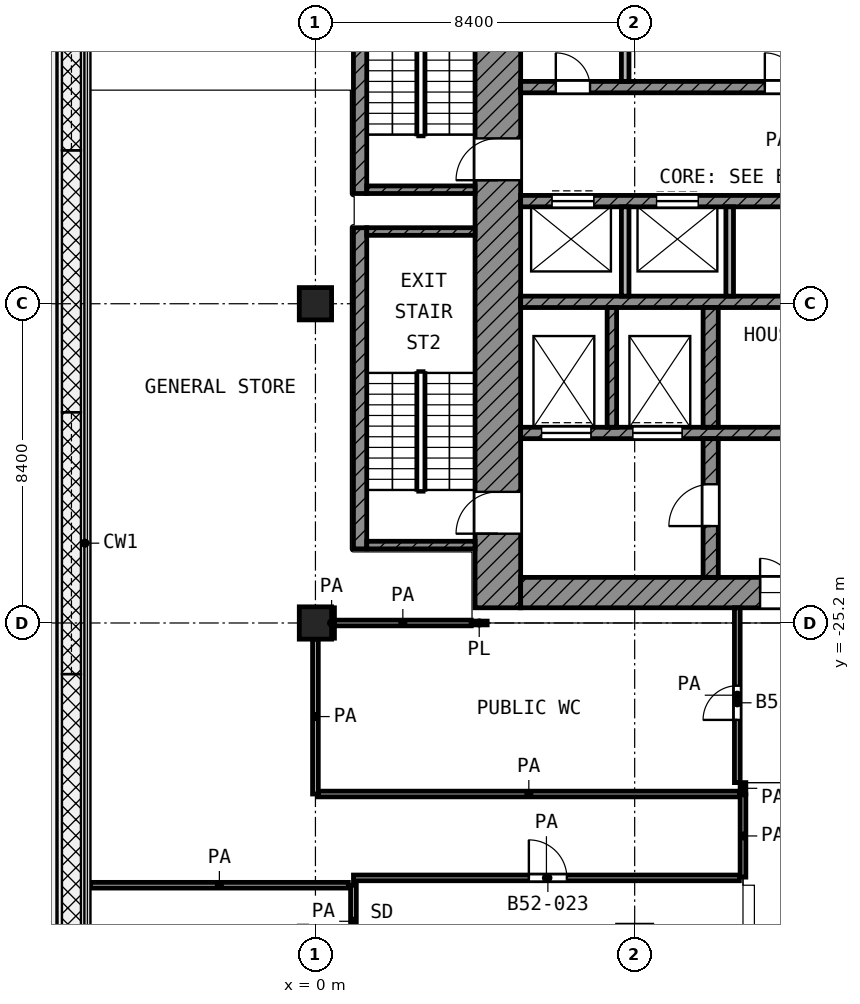
"""IFC4 building model, lengths in metres.
Left out: names, types, materials, properties, quantities, classifications, styles, units other than length and angle.
Written with IfcOpenShell. Run it as: python <this file> out.ifc"""

import sys

from ifc_helpers import new_model, si_unit, direction, frame, frame_2d, origin, origin_2d, place, context, subcontext, project, spatial, rectangle, extrude, element, fill, save


model = new_model("IFC4")
c1 = context("Model", 3, precision=1e-05, world=origin(), true_north=direction((0.0, 1.0)))
c2 = subcontext(c1, "Body", "Model", "MODEL_VIEW")
j1 = project(units=[si_unit("LENGTHUNIT", "METRE"), si_unit("PLANEANGLEUNIT", "RADIAN")], contexts=[c1])
p1 = place(None, origin())
s1 = spatial("IfcSite", under=j1, at=p1, CompositionType="ELEMENT")
p2 = place(p1, origin())
s2 = spatial("IfcBuilding", under=s1, at=p2, CompositionType="ELEMENT")
p3 = place(p2, frame((0.0, 0.0, 226.4)))
s3 = spatial("IfcBuildingStorey", under=s2, at=p3, CompositionType="ELEMENT", Elevation=226.4)
for number, where, z_axis, x_axis in (
    (1, (0.0, -16.8, 0.0), (0.0, 0.0, 1.0), (1.0, 0.0, 0.0)),
    (2, (0.0, -25.2, 0.0), (0.0, 0.0, 1.0), (1.0, 0.0, 0.0)),
):
    element("IfcColumn", number, at=place(p3, frame(where, z_axis=z_axis, x_axis=x_axis)), inside=s3, PredefinedType="COLUMN", context=c2, shape_type="SweptSolid", body=[
        extrude(rectangle(XDim=0.85, YDim=0.85, at=origin_2d()), origin(), (0.0, 0.0, 1.0), 4.2),
    ])
p4 = place(p3, frame((4.8, -24.8, 0.0), z_axis=(0.0, 0.0, 1.0), x_axis=(0.0, 1.0, 0.0)))
e3 = element("IfcWall", 3, at=p4, inside=s3, PredefinedType="SHEAR", context=c2, shape_type="SweptSolid", body=[
    extrude(rectangle(XDim=19.4, YDim=1.2, at=frame_2d((9.7, 0.0))), origin(), (0.0, 0.0, 1.0), 3.6),
])
p5 = place(p4, frame((11.25, 0.0, 0.0)))
e4 = element("IfcOpeningElement", 4, at=p5, cuts=e3, PredefinedType="OPENING", context=c2, shape_type="SweptSolid", body=[
    extrude(rectangle(XDim=1.1, YDim=2.1, at=frame_2d((0.55, 1.05))), frame((0.0, 0.61, 0.0), z_axis=(0.0, -1.0, 0.0), x_axis=(1.0, 0.0, 0.0)), (0.0, 0.0, 1.0), 1.22),
])
p6 = place(p4, frame((1.95, 0.0, 0.0)))
e5 = element("IfcOpeningElement", 5, at=p6, cuts=e3, PredefinedType="OPENING", context=c2, shape_type="SweptSolid", body=[
    extrude(rectangle(XDim=1.1, YDim=2.1, at=frame_2d((0.55, 1.05))), frame((0.0, 0.61, 0.0), z_axis=(0.0, -1.0, 0.0), x_axis=(1.0, 0.0, 0.0)), (0.0, 0.0, 1.0), 1.22),
])
p7 = place(p3, frame((5.4, -24.4, 0.0), z_axis=(0.0, 0.0, 1.0), x_axis=(1.0, 0.0, 0.0)))
e6 = element("IfcWall", 6, at=p7, inside=s3, PredefinedType="SHEAR", context=c2, shape_type="SweptSolid", body=[
    extrude(rectangle(XDim=18.6, YDim=0.8, at=frame_2d((9.3, 0.0))), origin(), (0.0, 0.0, 1.0), 3.6),
])
p8 = place(p7, frame((6.3, 0.0, 0.0)))
e7 = element("IfcOpeningElement", 7, at=p8, cuts=e6, PredefinedType="OPENING", context=c2, shape_type="SweptSolid", body=[
    extrude(rectangle(XDim=1.8, YDim=2.1, at=frame_2d((0.9, 1.05))), frame((0.0, 0.41, 0.0), z_axis=(0.0, -1.0, 0.0), x_axis=(1.0, 0.0, 0.0)), (0.0, 0.0, 1.0), 0.82),
])
p9 = place(p3, frame((5.4, -11.1, 0.0), z_axis=(0.0, 0.0, 1.0), x_axis=(1.0, 0.0, 0.0)))
e8 = element("IfcWall", 8, at=p9, inside=s3, PredefinedType="SHEAR", context=c2, shape_type="SweptSolid", body=[
    extrude(rectangle(XDim=16.65, YDim=0.3, at=frame_2d((8.325, 0.0))), origin(), (0.0, 0.0, 1.0), 3.6),
])
p10 = place(p9, frame((11.825, 0.0, 0.0)))
e9 = element("IfcOpeningElement", 9, at=p10, cuts=e8, PredefinedType="OPENING", context=c2, shape_type="SweptSolid", body=[
    extrude(rectangle(XDim=1.1, YDim=2.1, at=frame_2d((0.55, 1.05))), frame((0.0, 0.16, 0.0), z_axis=(0.0, -1.0, 0.0), x_axis=(1.0, 0.0, 0.0)), (0.0, 0.0, 1.0), 0.32),
])
p11 = place(p9, frame((14.575, 0.0, 0.0)))
e10 = element("IfcOpeningElement", 10, at=p11, cuts=e8, PredefinedType="OPENING", context=c2, shape_type="SweptSolid", body=[
    extrude(rectangle(XDim=1.1, YDim=2.1, at=frame_2d((0.55, 1.05))), frame((0.0, 0.16, 0.0), z_axis=(0.0, -1.0, 0.0), x_axis=(1.0, 0.0, 0.0)), (0.0, 0.0, 1.0), 0.32),
])
p12 = place(p9, frame((0.925, 0.0, 0.0)))
e11 = element("IfcOpeningElement", 11, at=p12, cuts=e8, PredefinedType="OPENING", context=c2, shape_type="SweptSolid", body=[
    extrude(rectangle(XDim=0.9, YDim=2.1, at=frame_2d((0.45, 1.05))), frame((0.0, 0.16, 0.0), z_axis=(0.0, -1.0, 0.0), x_axis=(1.0, 0.0, 0.0)), (0.0, 0.0, 1.0), 0.32),
])
p13 = place(p9, frame((6.425, 0.0, 0.0)))
e12 = element("IfcOpeningElement", 12, at=p13, cuts=e8, PredefinedType="OPENING", context=c2, shape_type="SweptSolid", body=[
    extrude(rectangle(XDim=0.9, YDim=2.1, at=frame_2d((0.45, 1.05))), frame((0.0, 0.16, 0.0), z_axis=(0.0, -1.0, 0.0), x_axis=(1.0, 0.0, 0.0)), (0.0, 0.0, 1.0), 0.32),
])
p14 = place(p3, frame((5.4, -14.1, 0.0), z_axis=(0.0, 0.0, 1.0), x_axis=(1.0, 0.0, 0.0)))
e13 = element("IfcWall", 13, at=p14, inside=s3, PredefinedType="SHEAR", context=c2, shape_type="SweptSolid", body=[
    extrude(rectangle(XDim=16.65, YDim=0.3, at=frame_2d((8.325, 0.0))), origin(), (0.0, 0.0, 1.0), 3.6),
])
p15 = place(p14, frame((0.825, 0.0, 0.0)))
e14 = element("IfcOpeningElement", 14, at=p15, cuts=e13, PredefinedType="OPENING", context=c2, shape_type="SweptSolid", body=[
    extrude(rectangle(XDim=1.1, YDim=2.1, at=frame_2d((0.55, 1.05))), frame((0.0, 0.16, 0.0), z_axis=(0.0, -1.0, 0.0), x_axis=(1.0, 0.0, 0.0)), (0.0, 0.0, 1.0), 0.32),
])
p16 = place(p14, frame((3.575, 0.0, 0.0)))
e15 = element("IfcOpeningElement", 15, at=p16, cuts=e13, PredefinedType="OPENING", context=c2, shape_type="SweptSolid", body=[
    extrude(rectangle(XDim=1.1, YDim=2.1, at=frame_2d((0.55, 1.05))), frame((0.0, 0.16, 0.0), z_axis=(0.0, -1.0, 0.0), x_axis=(1.0, 0.0, 0.0)), (0.0, 0.0, 1.0), 0.32),
])
p17 = place(p3, frame((5.4, -16.75, 0.0), z_axis=(0.0, 0.0, 1.0), x_axis=(1.0, 0.0, 0.0)))
e16 = element("IfcWall", 16, at=p17, inside=s3, PredefinedType="SHEAR", context=c2, shape_type="SweptSolid", body=[
    extrude(rectangle(XDim=16.65, YDim=0.3, at=frame_2d((8.325, 0.0))), origin(), (0.0, 0.0, 1.0), 3.6),
])
p18 = place(p3, frame((5.4, -20.2, 0.0), z_axis=(0.0, 0.0, 1.0), x_axis=(1.0, 0.0, 0.0)))
e17 = element("IfcWall", 17, at=p18, inside=s3, PredefinedType="SHEAR", context=c2, shape_type="SweptSolid", body=[
    extrude(rectangle(XDim=14.65, YDim=0.3, at=frame_2d((7.325, 0.0))), origin(), (0.0, 0.0, 1.0), 3.6),
])
p19 = place(p18, frame((10.55, 0.0, 0.0)))
e18 = element("IfcOpeningElement", 18, at=p19, cuts=e17, PredefinedType="OPENING", context=c2, shape_type="SweptSolid", body=[
    extrude(rectangle(XDim=1.3, YDim=2.1, at=frame_2d((0.65, 1.05))), frame((0.0, 0.16, 0.0), z_axis=(0.0, -1.0, 0.0), x_axis=(1.0, 0.0, 0.0)), (0.0, 0.0, 1.0), 0.32),
])
p20 = place(p18, frame((12.95, 0.0, 0.0)))
e19 = element("IfcOpeningElement", 19, at=p20, cuts=e17, PredefinedType="OPENING", context=c2, shape_type="SweptSolid", body=[
    extrude(rectangle(XDim=1.3, YDim=2.1, at=frame_2d((0.65, 1.05))), frame((0.0, 0.16, 0.0), z_axis=(0.0, -1.0, 0.0), x_axis=(1.0, 0.0, 0.0)), (0.0, 0.0, 1.0), 0.32),
])
p21 = place(p18, frame((0.55, 0.0, 0.0)))
e20 = element("IfcOpeningElement", 20, at=p21, cuts=e17, PredefinedType="OPENING", context=c2, shape_type="SweptSolid", body=[
    extrude(rectangle(XDim=1.3, YDim=2.1, at=frame_2d((0.65, 1.05))), frame((0.0, 0.16, 0.0), z_axis=(0.0, -1.0, 0.0), x_axis=(1.0, 0.0, 0.0)), (0.0, 0.0, 1.0), 0.32),
])
p22 = place(p18, frame((2.95, 0.0, 0.0)))
e21 = element("IfcOpeningElement", 21, at=p22, cuts=e17, PredefinedType="OPENING", context=c2, shape_type="SweptSolid", body=[
    extrude(rectangle(XDim=1.3, YDim=2.1, at=frame_2d((0.65, 1.05))), frame((0.0, 0.16, 0.0), z_axis=(0.0, -1.0, 0.0), x_axis=(1.0, 0.0, 0.0)), (0.0, 0.0, 1.0), 0.32),
])
p23 = place(p18, frame((7.15, 0.0, 0.0)))
e22 = element("IfcOpeningElement", 22, at=p23, cuts=e17, PredefinedType="OPENING", context=c2, shape_type="SweptSolid", body=[
    extrude(rectangle(XDim=0.9, YDim=2.1, at=frame_2d((0.45, 1.05))), frame((0.0, 0.16, 0.0), z_axis=(0.0, -1.0, 0.0), x_axis=(1.0, 0.0, 0.0)), (0.0, 0.0, 1.0), 0.32),
])
p24 = place(p3, frame((10.4, -24.0, 0.0), z_axis=(0.0, 0.0, 1.0), x_axis=(0.0, 1.0, 0.0)))
e23 = element("IfcWall", 23, at=p24, inside=s3, PredefinedType="SHEAR", context=c2, shape_type="SweptSolid", body=[
    extrude(rectangle(XDim=3.65, YDim=0.4, at=frame_2d((1.825, 0.0))), origin(), (0.0, 0.0, 1.0), 3.6),
])
p25 = place(p24, frame((1.35, 0.0, 0.0)))
e24 = element("IfcOpeningElement", 24, at=p25, cuts=e23, PredefinedType="OPENING", context=c2, shape_type="SweptSolid", body=[
    extrude(rectangle(XDim=1.1, YDim=2.1, at=frame_2d((0.55, 1.05))), frame((0.0, 0.21, 0.0), z_axis=(0.0, -1.0, 0.0), x_axis=(1.0, 0.0, 0.0)), (0.0, 0.0, 1.0), 0.42),
])
p26 = place(p3, frame((10.4, -20.05, 0.0), z_axis=(0.0, 0.0, 1.0), x_axis=(0.0, 1.0, 0.0)))
e25 = element("IfcWall", 25, at=p26, inside=s3, PredefinedType="SHEAR", context=c2, shape_type="SweptSolid", body=[
    extrude(rectangle(XDim=3.15, YDim=0.4, at=frame_2d((1.575, 0.0))), origin(), (0.0, 0.0, 1.0), 3.6),
])
p27 = place(p3, frame((7.8, -20.05, 0.0), z_axis=(0.0, 0.0, 1.0), x_axis=(0.0, 1.0, 0.0)))
e26 = element("IfcWall", 26, at=p27, inside=s3, PredefinedType="SHEAR", context=c2, shape_type="SweptSolid", body=[
    extrude(rectangle(XDim=3.15, YDim=0.25, at=frame_2d((1.575, 0.0))), origin(), (0.0, 0.0, 1.0), 3.6),
])
p28 = place(p3, frame((8.15, -10.95, 0.0), z_axis=(0.0, 0.0, 1.0), x_axis=(0.0, 1.0, 0.0)))
e27 = element("IfcWall", 27, at=p28, inside=s3, PredefinedType="PARTITIONING", context=c2, shape_type="SweptSolid", body=[
    extrude(rectangle(XDim=2.35, YDim=0.2, at=frame_2d((1.175, 0.0))), origin(), (0.0, 0.0, 1.0), 3.6),
])
for number, where, z_axis, x_axis in (
    (28, (8.15, -16.6, 0.0), (0.0, 0.0, 1.0), (0.0, 1.0, 0.0)),
    (29, (10.9, -16.6, 0.0), (0.0, 0.0, 1.0), (0.0, 1.0, 0.0)),
):
    element("IfcWall", number, at=place(p3, frame(where, z_axis=z_axis, x_axis=x_axis)), inside=s3, PredefinedType="PARTITIONING", context=c2, shape_type="SweptSolid", body=[
        extrude(rectangle(XDim=2.35, YDim=0.2, at=frame_2d((1.175, 0.0))), origin(), (0.0, 0.0, 1.0), 3.6),
    ])
p29 = place(p3, frame((1.175, -13.9, 0.0), z_axis=(0.0, 0.0, 1.0), x_axis=(0.0, 1.0, 0.0)))
e30 = element("IfcWall", 30, at=p29, inside=s3, PredefinedType="SHEAR", context=c2, shape_type="SweptSolid", body=[
    extrude(rectangle(XDim=8.45, YDim=0.35, at=frame_2d((4.225, 0.0))), origin(), (0.0, 0.0, 1.0), 3.6),
])
p30 = place(p3, frame((1.35, -13.8, 0.0), z_axis=(0.0, 0.0, 1.0), x_axis=(1.0, 0.0, 0.0)))
e31 = element("IfcWall", 31, at=p30, inside=s3, PredefinedType="SHEAR", context=c2, shape_type="SweptSolid", body=[
    extrude(rectangle(XDim=2.85, YDim=0.2, at=frame_2d((1.425, 0.0))), origin(), (0.0, 0.0, 1.0), 3.6),
])
p31 = place(p3, frame((1.175, -23.25, 0.0), z_axis=(0.0, 0.0, 1.0), x_axis=(0.0, 1.0, 0.0)))
e32 = element("IfcWall", 32, at=p31, inside=s3, PredefinedType="SHEAR", context=c2, shape_type="SweptSolid", body=[
    extrude(rectangle(XDim=8.45, YDim=0.35, at=frame_2d((4.225, 0.0))), origin(), (0.0, 0.0, 1.0), 3.6),
])
for number, where, z_axis, x_axis in (
    (33, (1.35, -14.9, 0.0), (0.0, 0.0, 1.0), (1.0, 0.0, 0.0)),
    (34, (1.35, -23.15, 0.0), (0.0, 0.0, 1.0), (1.0, 0.0, 0.0)),
):
    element("IfcWall", number, at=place(p3, frame(where, z_axis=z_axis, x_axis=x_axis)), inside=s3, PredefinedType="SHEAR", context=c2, shape_type="SweptSolid", body=[
        extrude(rectangle(XDim=2.85, YDim=0.2, at=frame_2d((1.425, 0.0))), origin(), (0.0, 0.0, 1.0), 3.6),
    ])
p32 = place(p3, frame((4.1, -25.2, 0.0), z_axis=(0.0, 0.0, 1.0), x_axis=(1.0, 0.0, 0.0)))
e35 = element("IfcWall", 35, at=p32, inside=s3, PredefinedType="PARTITIONING", context=c2, shape_type="SweptSolid", body=[
    extrude(rectangle(XDim=0.419, YDim=0.1, at=frame_2d((0.209, 0.0))), origin(), (0.0, 0.0, 1.0), 3.6),
])
p33 = place(p3, frame((-5.92, -32.1, 0.0), z_axis=(0.0, 0.0, 1.0), x_axis=(1.0, 0.0, 0.0)))
e36 = element("IfcWall", 36, at=p33, inside=s3, PredefinedType="PARTITIONING", context=c2, shape_type="SweptSolid", body=[
    extrude(rectangle(XDim=6.785, YDim=0.15, at=frame_2d((3.393, 0.0))), origin(), (0.0, 0.0, 1.0), 3.6),
])
p34 = place(p3, frame((1.001, -31.907, 0.0), z_axis=(0.0, 0.0, 1.0), x_axis=(1.0, 0.0, 0.0)))
e37 = element("IfcWall", 37, at=p34, inside=s3, PredefinedType="PARTITIONING", context=c2, shape_type="SweptSolid", body=[
    extrude(rectangle(XDim=10.154, YDim=0.15, at=frame_2d((5.077, 0.0))), origin(), (0.0, 0.0, 1.0), 3.6),
])
p35 = place(p34, frame((4.615, 0.0, 0.0)))
e38 = element("IfcOpeningElement", 38, at=p35, cuts=e37, PredefinedType="OPENING", context=c2, shape_type="SweptSolid", body=[
    extrude(rectangle(XDim=1.0, YDim=2.1, at=frame_2d((0.5, 1.05))), frame((0.0, 0.085, 0.0), z_axis=(0.0, -1.0, 0.0), x_axis=(1.0, 0.0, 0.0)), (0.0, 0.0, 1.0), 0.17),
])
p36 = place(p3, frame((0.075, -29.7, 0.0), z_axis=(0.0, 0.0, 1.0), x_axis=(1.0, 0.0, 0.0)))
e39 = element("IfcWall", 39, at=p36, inside=s3, PredefinedType="PARTITIONING", context=c2, shape_type="SweptSolid", body=[
    extrude(rectangle(XDim=11.08, YDim=0.15, at=frame_2d((5.54, 0.0))), origin(), (0.0, 0.0, 1.0), 3.6),
])
p37 = place(p3, frame((0.5, -25.2, 0.0), z_axis=(0.0, 0.0, 1.0), x_axis=(1.0, 0.0, 0.0)))
e40 = element("IfcWall", 40, at=p37, inside=s3, PredefinedType="PARTITIONING", context=c2, shape_type="SweptSolid", body=[
    extrude(rectangle(XDim=3.6, YDim=0.15, at=frame_2d((1.8, 0.0))), origin(), (0.0, 0.0, 1.0), 3.6),
])
p38 = place(p3, frame((0.0, -29.7, 0.0), z_axis=(0.0, 0.0, 1.0), x_axis=(0.0, 1.0, 0.0)))
e41 = element("IfcWall", 41, at=p38, inside=s3, PredefinedType="PARTITIONING", context=c2, shape_type="SweptSolid", body=[
    extrude(rectangle(XDim=4.075, YDim=0.15, at=frame_2d((2.038, 0.0))), origin(), (0.0, 0.0, 1.0), 3.6),
])
p39 = place(p3, frame((0.425, -25.6, 0.0), z_axis=(0.0, 0.0, 1.0), x_axis=(0.0, 1.0, 0.0)))
e42 = element("IfcWall", 42, at=p39, inside=s3, PredefinedType="PARTITIONING", context=c2, shape_type="SweptSolid", body=[
    extrude(rectangle(XDim=0.8, YDim=0.15, at=frame_2d((0.4, 0.0))), origin(), (0.0, 0.0, 1.0), 3.6),
])
p40 = place(p3, frame((1.0, -33.997, 0.0), z_axis=(0.0, 0.0, 1.0), x_axis=(0.0, 1.0, 0.0)))
e43 = element("IfcWall", 43, at=p40, inside=s3, PredefinedType="PARTITIONING", context=c2, shape_type="SweptSolid", body=[
    extrude(rectangle(XDim=1.897, YDim=0.15, at=frame_2d((0.948, 0.0))), origin(), (0.0, 0.0, 1.0), 3.6),
])
p41 = place(p3, frame((11.1, -29.4, 0.0), z_axis=(0.0, 0.0, 1.0), x_axis=(0.0, 1.0, 0.0)))
e44 = element("IfcWall", 44, at=p41, inside=s3, PredefinedType="PARTITIONING", context=c2, shape_type="SweptSolid", body=[
    extrude(rectangle(XDim=4.6, YDim=0.15, at=frame_2d((2.3, 0.0))), origin(), (0.0, 0.0, 1.0), 3.6),
])
p42 = place(p41, frame((1.65, 0.0, 0.0)))
e45 = element("IfcOpeningElement", 45, at=p42, cuts=e44, PredefinedType="OPENING", context=c2, shape_type="SweptSolid", body=[
    extrude(rectangle(XDim=0.9, YDim=2.1, at=frame_2d((0.45, 1.05))), frame((0.0, 0.085, 0.0), z_axis=(0.0, -1.0, 0.0), x_axis=(1.0, 0.0, 0.0)), (0.0, 0.0, 1.0), 0.17),
])
p43 = place(p3, frame((11.25, -31.887, 0.0), z_axis=(0.0, 0.0, 1.0), x_axis=(0.0, 1.0, 0.0)))
e46 = element("IfcWall", 46, at=p43, inside=s3, PredefinedType="PARTITIONING", context=c2, shape_type="SweptSolid", body=[
    extrude(rectangle(XDim=2.167, YDim=0.15, at=frame_2d((1.083, 0.0))), origin(), (0.0, 0.0, 1.0), 3.6),
])
p44 = place(p3, frame((11.25, -29.7, 0.0), z_axis=(0.0, 0.0, 1.0), x_axis=(0.0, 1.0, 0.0)))
e47 = element("IfcWall", 47, at=p44, inside=s3, PredefinedType="PARTITIONING", context=c2, shape_type="SweptSolid", body=[
    extrude(rectangle(XDim=0.3, YDim=0.15, at=frame_2d((0.15, 0.0))), origin(), (0.0, 0.0, 1.0), 3.6),
])
p45 = place(p15, origin())
e48 = element("IfcDoor", 48, at=p45, inside=s3, OperationType="DOUBLE_DOOR_SLIDING", PredefinedType="DOOR", context=c2, shape_type="SweptSolid", body=[
    extrude(rectangle(XDim=1.1, YDim=2.1, at=frame_2d((0.55, 1.05))), frame((0.0, 0.025, 0.0), z_axis=(0.0, -1.0, 0.0), x_axis=(1.0, 0.0, 0.0)), (0.0, 0.0, 1.0), 0.05),
])
fill(e14, e48)
p46 = place(p16, origin())
e49 = element("IfcDoor", 49, at=p46, inside=s3, OperationType="DOUBLE_DOOR_SLIDING", PredefinedType="DOOR", context=c2, shape_type="SweptSolid", body=[
    extrude(rectangle(XDim=1.1, YDim=2.1, at=frame_2d((0.55, 1.05))), frame((0.0, 0.025, 0.0), z_axis=(0.0, -1.0, 0.0), x_axis=(1.0, 0.0, 0.0)), (0.0, 0.0, 1.0), 0.05),
])
fill(e15, e49)
p47 = place(p21, origin())
e50 = element("IfcDoor", 50, at=p47, inside=s3, OperationType="DOUBLE_DOOR_SLIDING", PredefinedType="DOOR", context=c2, shape_type="SweptSolid", body=[
    extrude(rectangle(XDim=1.3, YDim=2.1, at=frame_2d((0.65, 1.05))), frame((0.0, 0.025, 0.0), z_axis=(0.0, -1.0, 0.0), x_axis=(1.0, 0.0, 0.0)), (0.0, 0.0, 1.0), 0.05),
])
fill(e20, e50)
p48 = place(p22, origin())
e51 = element("IfcDoor", 51, at=p48, inside=s3, OperationType="DOUBLE_DOOR_SLIDING", PredefinedType="DOOR", context=c2, shape_type="SweptSolid", body=[
    extrude(rectangle(XDim=1.3, YDim=2.1, at=frame_2d((0.65, 1.05))), frame((0.0, 0.025, 0.0), z_axis=(0.0, -1.0, 0.0), x_axis=(1.0, 0.0, 0.0)), (0.0, 0.0, 1.0), 0.05),
])
fill(e21, e51)
p49 = place(p5, origin())
e52 = element("IfcDoor", 52, at=p49, inside=s3, OperationType="SINGLE_SWING_LEFT", PredefinedType="DOOR", context=c2, shape_type="SweptSolid", body=[
    extrude(rectangle(XDim=1.1, YDim=2.1, at=frame_2d((0.55, 1.05))), frame((0.0, 0.025, 0.0), z_axis=(0.0, -1.0, 0.0), x_axis=(1.0, 0.0, 0.0)), (0.0, 0.0, 1.0), 0.05),
])
fill(e4, e52)
p50 = place(p6, origin())
e53 = element("IfcDoor", 53, at=p50, inside=s3, OperationType="SINGLE_SWING_LEFT", PredefinedType="DOOR", context=c2, shape_type="SweptSolid", body=[
    extrude(rectangle(XDim=1.1, YDim=2.1, at=frame_2d((0.55, 1.05))), frame((0.0, 0.025, 0.0), z_axis=(0.0, -1.0, 0.0), x_axis=(1.0, 0.0, 0.0)), (0.0, 0.0, 1.0), 0.05),
])
fill(e5, e53)
p51 = place(p25, origin())
e54 = element("IfcDoor", 54, at=p51, inside=s3, OperationType="SINGLE_SWING_LEFT", PredefinedType="DOOR", context=c2, shape_type="SweptSolid", body=[
    extrude(rectangle(XDim=1.1, YDim=2.1, at=frame_2d((0.55, 1.05))), frame((0.0, 0.025, 0.0), z_axis=(0.0, -1.0, 0.0), x_axis=(1.0, 0.0, 0.0)), (0.0, 0.0, 1.0), 0.05),
])
fill(e24, e54)
p52 = place(p8, origin())
e55 = element("IfcDoor", 55, at=p52, inside=s3, OperationType="DOUBLE_DOOR_SINGLE_SWING", PredefinedType="DOOR", context=c2, shape_type="SweptSolid", body=[
    extrude(rectangle(XDim=1.8, YDim=2.1, at=frame_2d((0.9, 1.05))), frame((0.0, 0.025, 0.0), z_axis=(0.0, -1.0, 0.0), x_axis=(1.0, 0.0, 0.0)), (0.0, 0.0, 1.0), 0.05),
])
fill(e7, e55)
p53 = place(p12, origin())
e56 = element("IfcDoor", 56, at=p53, inside=s3, OperationType="SINGLE_SWING_LEFT", PredefinedType="DOOR", context=c2, shape_type="SweptSolid", body=[
    extrude(rectangle(XDim=0.9, YDim=2.1, at=frame_2d((0.45, 1.05))), frame((0.0, 0.025, 0.0), z_axis=(0.0, -1.0, 0.0), x_axis=(1.0, 0.0, 0.0)), (0.0, 0.0, 1.0), 0.05),
])
fill(e11, e56)
p54 = place(p13, origin())
e57 = element("IfcDoor", 57, at=p54, inside=s3, OperationType="SINGLE_SWING_LEFT", PredefinedType="DOOR", context=c2, shape_type="SweptSolid", body=[
    extrude(rectangle(XDim=0.9, YDim=2.1, at=frame_2d((0.45, 1.05))), frame((0.0, 0.025, 0.0), z_axis=(0.0, -1.0, 0.0), x_axis=(1.0, 0.0, 0.0)), (0.0, 0.0, 1.0), 0.05),
])
fill(e12, e57)
p55 = place(p42, origin())
e58 = element("IfcDoor", 58, at=p55, inside=s3, OperationType="SINGLE_SWING_LEFT", PredefinedType="DOOR", context=c2, shape_type="SweptSolid", body=[
    extrude(rectangle(XDim=0.9, YDim=2.1, at=frame_2d((0.45, 1.05))), frame((0.0, 0.025, 0.0), z_axis=(0.0, -1.0, 0.0), x_axis=(1.0, 0.0, 0.0)), (0.0, 0.0, 1.0), 0.05),
])
fill(e45, e58)
p56 = place(p35, origin())
e59 = element("IfcDoor", 59, at=p56, inside=s3, OperationType="SINGLE_SWING_LEFT", PredefinedType="DOOR", context=c2, shape_type="SweptSolid", body=[
    extrude(rectangle(XDim=1.0, YDim=2.1, at=frame_2d((0.5, 1.05))), frame((0.0, 0.025, 0.0), z_axis=(0.0, -1.0, 0.0), x_axis=(1.0, 0.0, 0.0)), (0.0, 0.0, 1.0), 0.05),
])
fill(e38, e59)
save(model, sys.argv[1])
